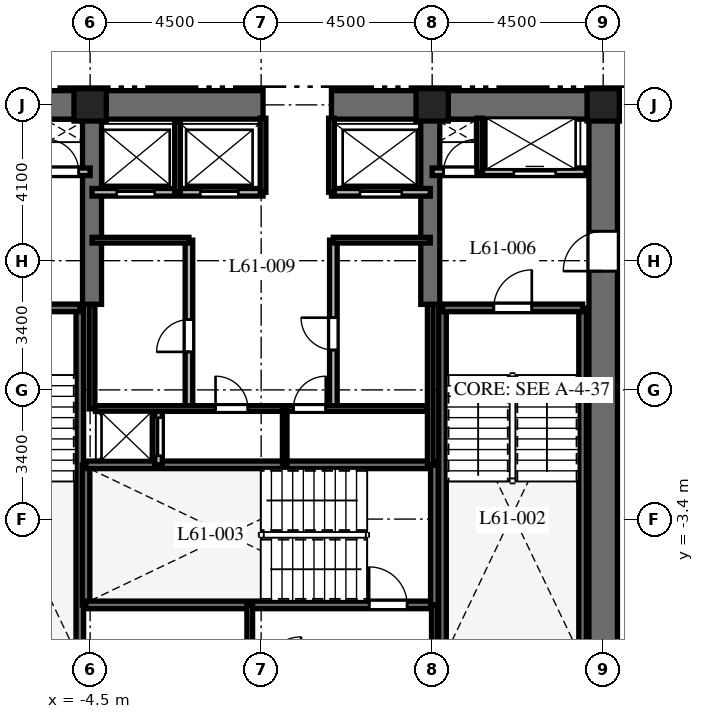
"""IFC4 building model, lengths in metres.
Left out: names, types, materials, properties, quantities, classifications, styles, units other than length and angle.
Written with IfcOpenShell. Run it as: python <this file> out.ifc"""

import sys

from ifc_helpers import new_model, si_unit, direction, frame, frame_2d, origin, origin_2d, place, context, subcontext, project, spatial, rectangle, extrude, element, fill, save


model = new_model("IFC4")
c1 = context("Model", 3, precision=1e-05, world=origin(), true_north=direction((0.0, 1.0)))
c2 = subcontext(c1, "Body", "Model", "MODEL_VIEW")
j1 = project(units=[si_unit("LENGTHUNIT", "METRE"), si_unit("PLANEANGLEUNIT", "RADIAN")], contexts=[c1])
p1 = place(None, origin())
s1 = spatial("IfcSite", under=j1, at=p1, CompositionType="ELEMENT")
p2 = place(p1, origin())
s2 = spatial("IfcBuilding", under=s1, at=p2, CompositionType="ELEMENT")
p3 = place(p2, frame((0.0, 0.0, 244.5)))
s3 = spatial("IfcBuildingStorey", under=s2, at=p3, CompositionType="ELEMENT", Elevation=244.5)
p4 = place(p3, frame((-9.375, 7.5, 0.0), z_axis=(0.0, 0.0, 1.0), x_axis=(1.0, 0.0, 0.0)))
e1 = element("IfcWall", 1, at=p4, inside=s3, PredefinedType="SHEAR", context=c2, shape_type="SweptSolid", body=[
    extrude(rectangle(XDim=9.425, YDim=0.75, at=frame_2d((4.712, 0.0))), origin(), (0.0, 0.0, 1.0), 3.8),
])
p5 = place(p3, frame((1.85, 7.5, 0.0), z_axis=(0.0, 0.0, 1.0), x_axis=(1.0, 0.0, 0.0)))
e2 = element("IfcWall", 2, at=p5, inside=s3, PredefinedType="SHEAR", context=c2, shape_type="SweptSolid", body=[
    extrude(rectangle(XDim=7.525, YDim=0.75, at=frame_2d((3.762, 0.0))), origin(), (0.0, 0.0, 1.0), 3.8),
])
p6 = place(p3, frame((9.0, -7.125, 0.0), z_axis=(0.0, 0.0, 1.0), x_axis=(0.0, 1.0, 0.0)))
e3 = element("IfcWall", 3, at=p6, inside=s3, PredefinedType="SHEAR", context=c2, shape_type="SweptSolid", body=[
    extrude(rectangle(XDim=14.25, YDim=0.75, at=frame_2d((7.125, 0.0))), origin(), (0.0, 0.0, 1.0), 3.8),
])
p7 = place(p6, frame((10.25, 0.0, 0.0)))
e4 = element("IfcOpeningElement", 4, at=p7, cuts=e3, PredefinedType="OPENING", context=c2, shape_type="SweptSolid", body=[
    extrude(rectangle(XDim=1.05, YDim=2.15, at=frame_2d((0.525, 1.075))), frame((0.0, 0.385, 0.0), z_axis=(0.0, -1.0, 0.0), x_axis=(1.0, 0.0, 0.0)), (0.0, 0.0, 1.0), 0.77),
])
for number, where, z_axis, x_axis in (
    (5, (-4.45, 2.25, 0.0), (0.0, 0.0, 1.0), (0.0, 1.0, 0.0)),
    (6, (4.45, 2.25, 0.0), (0.0, 0.0, 1.0), (0.0, 1.0, 0.0)),
):
    element("IfcWall", number, at=place(p3, frame(where, z_axis=z_axis, x_axis=x_axis)), inside=s3, PredefinedType="SHEAR", context=c2, shape_type="SweptSolid", body=[
        extrude(rectangle(XDim=4.875, YDim=0.5, at=frame_2d((2.438, 0.0))), origin(), (0.0, 0.0, 1.0), 3.8),
    ])
p8 = place(p3, frame((-4.772, -6.985, 0.0), z_axis=(0.0, 0.0, 1.0), x_axis=(0.0, 1.0, 0.0)))
e7 = element("IfcWall", 7, at=p8, inside=s3, PredefinedType="SHEAR", context=c2, shape_type="SweptSolid", body=[
    extrude(rectangle(XDim=9.143, YDim=0.2, at=frame_2d((4.572, 0.0))), origin(), (0.0, 0.0, 1.0), 3.8),
])
p9 = place(p3, frame((-8.458, 2.158, 0.0), z_axis=(0.0, 0.0, 1.0), x_axis=(1.0, 0.0, 0.0)))
e8 = element("IfcWall", 8, at=p9, inside=s3, PredefinedType="SHEAR", context=c2, shape_type="SweptSolid", body=[
    extrude(rectangle(XDim=3.686, YDim=0.2, at=frame_2d((1.843, 0.0))), origin(), (0.0, 0.0, 1.0), 3.8),
])
p10 = place(p9, frame((1.3, 0.0, 0.0)))
e9 = element("IfcOpeningElement", 9, at=p10, cuts=e8, PredefinedType="OPENING", context=c2, shape_type="SweptSolid", body=[
    extrude(rectangle(XDim=1.0, YDim=2.15, at=frame_2d((0.5, 1.075))), frame((0.0, 0.11, 0.0), z_axis=(0.0, -1.0, 0.0), x_axis=(1.0, 0.0, 0.0)), (0.0, 0.0, 1.0), 0.22),
])
for number, where, z_axis, x_axis in (
    (10, (4.772, -6.985, 0.0), (0.0, 0.0, 1.0), (0.0, 1.0, 0.0)),
    (11, (8.458, -6.985, 0.0), (0.0, 0.0, 1.0), (0.0, 1.0, 0.0)),
):
    element("IfcWall", number, at=place(p3, frame(where, z_axis=z_axis, x_axis=x_axis)), inside=s3, PredefinedType="SHEAR", context=c2, shape_type="SweptSolid", body=[
        extrude(rectangle(XDim=9.143, YDim=0.2, at=frame_2d((4.572, 0.0))), origin(), (0.0, 0.0, 1.0), 3.8),
    ])
p11 = place(p3, frame((4.772, 2.158, 0.0), z_axis=(0.0, 0.0, 1.0), x_axis=(1.0, 0.0, 0.0)))
e12 = element("IfcWall", 12, at=p11, inside=s3, PredefinedType="SHEAR", context=c2, shape_type="SweptSolid", body=[
    extrude(rectangle(XDim=3.686, YDim=0.2, at=frame_2d((1.843, 0.0))), origin(), (0.0, 0.0, 1.0), 3.8),
])
p12 = place(p11, frame((1.35, 0.0, 0.0)))
e13 = element("IfcOpeningElement", 13, at=p12, cuts=e12, PredefinedType="OPENING", context=c2, shape_type="SweptSolid", body=[
    extrude(rectangle(XDim=1.0, YDim=2.15, at=frame_2d((0.5, 1.075))), frame((0.0, 0.11, 0.0), z_axis=(0.0, -1.0, 0.0), x_axis=(1.0, 0.0, 0.0)), (0.0, 0.0, 1.0), 0.22),
])
p13 = place(p3, frame((-4.608, -5.658, 0.0), z_axis=(0.0, 0.0, 1.0), x_axis=(0.0, 1.0, 0.0)))
e14 = element("IfcWall", 14, at=p13, inside=s3, PredefinedType="SHEAR", context=c2, shape_type="SweptSolid", body=[
    extrude(rectangle(XDim=3.686, YDim=0.2, at=frame_2d((1.843, 0.0))), origin(), (0.0, 0.0, 1.0), 3.8),
])
p14 = place(p3, frame((-4.608, -5.658, 0.0), z_axis=(0.0, 0.0, 1.0), x_axis=(1.0, 0.0, 0.0)))
e15 = element("IfcWall", 15, at=p14, inside=s3, PredefinedType="SHEAR", context=c2, shape_type="SweptSolid", body=[
    extrude(rectangle(XDim=9.166, YDim=0.2, at=frame_2d((4.583, 0.0))), origin(), (0.0, 0.0, 1.0), 3.8),
])
p15 = place(p14, frame((7.45, 0.0, 0.0)))
e16 = element("IfcOpeningElement", 16, at=p15, cuts=e15, PredefinedType="OPENING", context=c2, shape_type="SweptSolid", body=[
    extrude(rectangle(XDim=1.0, YDim=2.15, at=frame_2d((0.5, 1.075))), frame((0.0, 0.11, 0.0), z_axis=(0.0, -1.0, 0.0), x_axis=(1.0, 0.0, 0.0)), (0.0, 0.0, 1.0), 0.22),
])
p16 = place(p3, frame((-4.608, -1.972, 0.0), z_axis=(0.0, 0.0, 1.0), x_axis=(1.0, 0.0, 0.0)))
e17 = element("IfcWall", 17, at=p16, inside=s3, PredefinedType="SHEAR", context=c2, shape_type="SweptSolid", body=[
    extrude(rectangle(XDim=9.166, YDim=0.2, at=frame_2d((4.583, 0.0))), origin(), (0.0, 0.0, 1.0), 3.8),
])
p17 = place(p3, frame((4.558, -5.658, 0.0), z_axis=(0.0, 0.0, 1.0), x_axis=(0.0, 1.0, 0.0)))
e18 = element("IfcWall", 18, at=p17, inside=s3, PredefinedType="SHEAR", context=c2, shape_type="SweptSolid", body=[
    extrude(rectangle(XDim=3.686, YDim=0.2, at=frame_2d((1.843, 0.0))), origin(), (0.0, 0.0, 1.0), 3.8),
])
for number, where, z_axis, x_axis in (
    (19, (9.0, 7.5, 0.0), (0.0, 0.0, 1.0), (1.0, 0.0, 0.0)),
    (20, (4.5, 7.5, 0.0), (0.0, 0.0, 1.0), (1.0, 0.0, 0.0)),
    (21, (-4.5, 7.5, 0.0), (0.0, 0.0, 1.0), (1.0, 0.0, 0.0)),
):
    element("IfcColumn", number, at=place(p3, frame(where, z_axis=z_axis, x_axis=x_axis)), inside=s3, PredefinedType="COLUMN", context=c2, shape_type="SweptSolid", body=[
        extrude(rectangle(XDim=0.85, YDim=0.85, at=origin_2d()), origin(), (0.0, 0.0, 1.0), 3.8),
    ])
for number, where, z_axis, x_axis in (
    (22, (-0.3, -7.02, 0.0), (0.0, 0.0, 1.0), (0.0, 1.0, 0.0)),
    (23, (4.558, -7.02, 0.0), (0.0, 0.0, 1.0), (0.0, 1.0, 0.0)),
):
    element("IfcWall", number, at=place(p3, frame(where, z_axis=z_axis, x_axis=x_axis)), inside=s3, PredefinedType="PARTITIONING", context=c2, shape_type="SweptSolid", body=[
        extrude(rectangle(XDim=1.362, YDim=0.15, at=frame_2d((0.681, 0.0))), origin(), (0.0, 0.0, 1.0), 3.5),
    ])
p18 = place(p3, frame((-8.55, 5.74, 0.0), z_axis=(0.0, 0.0, 1.0), x_axis=(1.0, 0.0, 0.0)))
e24 = element("IfcWall", 24, at=p18, inside=s3, PredefinedType="PARTITIONING", context=c2, shape_type="SweptSolid", body=[
    extrude(rectangle(XDim=4.05, YDim=0.2, at=frame_2d((2.025, 0.0))), origin(), (0.0, 0.0, 1.0), 3.5),
])
p19 = place(p18, frame((0.75, 0.0, 0.0)))
e25 = element("IfcOpeningElement", 25, at=p19, cuts=e24, PredefinedType="OPENING", context=c2, shape_type="SweptSolid", body=[
    extrude(rectangle(XDim=1.1, YDim=2.2, at=frame_2d((0.55, 1.1))), frame((0.0, 0.11, 0.0), z_axis=(0.0, -1.0, 0.0), x_axis=(1.0, 0.0, 0.0)), (0.0, 0.0, 1.0), 0.22),
])
p20 = place(p18, frame((2.9, 0.0, 0.0)))
e26 = element("IfcOpeningElement", 26, at=p20, cuts=e24, PredefinedType="OPENING", context=c2, shape_type="SweptSolid", body=[
    extrude(rectangle(XDim=0.85, YDim=2.03, at=frame_2d((0.425, 1.015))), frame((0.0, 0.11, 0.0), z_axis=(0.0, -1.0, 0.0), x_axis=(1.0, 0.0, 0.0)), (0.0, 0.0, 1.0), 0.22),
])
p21 = place(p3, frame((4.5, 5.74, 0.0), z_axis=(0.0, 0.0, 1.0), x_axis=(1.0, 0.0, 0.0)))
e27 = element("IfcWall", 27, at=p21, inside=s3, PredefinedType="PARTITIONING", context=c2, shape_type="SweptSolid", body=[
    extrude(rectangle(XDim=4.05, YDim=0.2, at=frame_2d((2.025, 0.0))), origin(), (0.0, 0.0, 1.0), 3.5),
])
p22 = place(p21, frame((0.3, 0.0, 0.0)))
e28 = element("IfcOpeningElement", 28, at=p22, cuts=e27, PredefinedType="OPENING", context=c2, shape_type="SweptSolid", body=[
    extrude(rectangle(XDim=0.85, YDim=2.03, at=frame_2d((0.425, 1.015))), frame((0.0, 0.11, 0.0), z_axis=(0.0, -1.0, 0.0), x_axis=(1.0, 0.0, 0.0)), (0.0, 0.0, 1.0), 0.22),
])
p23 = place(p21, frame((2.15, 0.0, 0.0)))
e29 = element("IfcOpeningElement", 29, at=p23, cuts=e27, PredefinedType="OPENING", context=c2, shape_type="SweptSolid", body=[
    extrude(rectangle(XDim=1.1, YDim=2.2, at=frame_2d((0.55, 1.1))), frame((0.0, 0.11, 0.0), z_axis=(0.0, -1.0, 0.0), x_axis=(1.0, 0.0, 0.0)), (0.0, 0.0, 1.0), 0.22),
])
p24 = place(p3, frame((5.75, 5.74, 0.0), z_axis=(0.0, 0.0, 1.0), x_axis=(0.0, 1.0, 0.0)))
e30 = element("IfcWall", 30, at=p24, inside=s3, PredefinedType="PARTITIONING", context=c2, shape_type="SweptSolid", body=[
    extrude(rectangle(XDim=1.41, YDim=0.15, at=frame_2d((0.705, 0.0))), origin(), (0.0, 0.0, 1.0), 3.5),
])
p25 = place(p3, frame((-2.7, -1.972, 0.0), z_axis=(0.0, 0.0, 1.0), x_axis=(0.0, 1.0, 0.0)))
e31 = element("IfcWall", 31, at=p25, inside=s3, PredefinedType="PARTITIONING", context=c2, shape_type="SweptSolid", body=[
    extrude(rectangle(XDim=1.472, YDim=0.2, at=frame_2d((0.736, 0.0))), origin(), (0.0, 0.0, 1.0), 3.5),
])
p26 = place(p25, frame((0.24, 0.0, 0.0)))
e32 = element("IfcOpeningElement", 32, at=p26, cuts=e31, PredefinedType="OPENING", context=c2, shape_type="SweptSolid", body=[
    extrude(rectangle(XDim=1.0, YDim=2.2, at=frame_2d((0.5, 1.1))), frame((0.0, 0.11, 0.0), z_axis=(0.0, -1.0, 0.0), x_axis=(1.0, 0.0, 0.0)), (0.0, 0.0, 1.0), 0.22),
])
p27 = place(p3, frame((-4.45, 5.2, 0.0), z_axis=(0.0, 0.0, 1.0), x_axis=(1.0, 0.0, 0.0)))
e33 = element("IfcWall", 33, at=p27, inside=s3, PredefinedType="PARTITIONING", context=c2, shape_type="SweptSolid", body=[
    extrude(rectangle(XDim=4.5, YDim=0.2, at=frame_2d((2.25, 0.0))), origin(), (0.0, 0.0, 1.0), 3.5),
])
p28 = place(p27, frame((0.65, 0.0, 0.0)))
e34 = element("IfcOpeningElement", 34, at=p28, cuts=e33, PredefinedType="OPENING", context=c2, shape_type="SweptSolid", body=[
    extrude(rectangle(XDim=1.0, YDim=2.2, at=frame_2d((0.5, 1.1))), frame((0.0, 0.11, 0.0), z_axis=(0.0, -1.0, 0.0), x_axis=(1.0, 0.0, 0.0)), (0.0, 0.0, 1.0), 0.22),
])
p29 = place(p27, frame((2.85, 0.0, 0.0)))
e35 = element("IfcOpeningElement", 35, at=p29, cuts=e33, PredefinedType="OPENING", context=c2, shape_type="SweptSolid", body=[
    extrude(rectangle(XDim=1.0, YDim=2.2, at=frame_2d((0.5, 1.1))), frame((0.0, 0.11, 0.0), z_axis=(0.0, -1.0, 0.0), x_axis=(1.0, 0.0, 0.0)), (0.0, 0.0, 1.0), 0.22),
])
p30 = place(p3, frame((1.85, 5.2, 0.0), z_axis=(0.0, 0.0, 1.0), x_axis=(1.0, 0.0, 0.0)))
e36 = element("IfcWall", 36, at=p30, inside=s3, PredefinedType="PARTITIONING", context=c2, shape_type="SweptSolid", body=[
    extrude(rectangle(XDim=2.6, YDim=0.2, at=frame_2d((1.3, 0.0))), origin(), (0.0, 0.0, 1.0), 3.5),
])
p31 = place(p30, frame((0.75, 0.0, 0.0)))
e37 = element("IfcOpeningElement", 37, at=p31, cuts=e36, PredefinedType="OPENING", context=c2, shape_type="SweptSolid", body=[
    extrude(rectangle(XDim=1.1, YDim=2.2, at=frame_2d((0.55, 1.1))), frame((0.0, 0.11, 0.0), z_axis=(0.0, -1.0, 0.0), x_axis=(1.0, 0.0, 0.0)), (0.0, 0.0, 1.0), 0.22),
])
p32 = place(p3, frame((-2.2, 5.2, 0.0), z_axis=(0.0, 0.0, 1.0), x_axis=(0.0, 1.0, 0.0)))
e38 = element("IfcWall", 38, at=p32, inside=s3, PredefinedType="PARTITIONING", context=c2, shape_type="SweptSolid", body=[
    extrude(rectangle(XDim=1.85, YDim=0.15, at=frame_2d((0.925, 0.0))), origin(), (0.0, 0.0, 1.0), 3.5),
])
for number, where, z_axis, x_axis in (
    (39, (0.05, 5.2, 0.0), (0.0, 0.0, 1.0), (0.0, 1.0, 0.0)),
    (40, (1.85, 5.2, 0.0), (0.0, 0.0, 1.0), (0.0, 1.0, 0.0)),
):
    element("IfcWall", number, at=place(p3, frame(where, z_axis=z_axis, x_axis=x_axis)), inside=s3, PredefinedType="PARTITIONING", context=c2, shape_type="SweptSolid", body=[
        extrude(rectangle(XDim=1.95, YDim=0.15, at=frame_2d((0.975, 0.0))), origin(), (0.0, 0.0, 1.0), 3.5),
    ])
p33 = place(p3, frame((-4.45, -0.5, 0.0), z_axis=(0.0, 0.0, 1.0), x_axis=(0.0, 1.0, 0.0)))
e41 = element("IfcWall", 41, at=p33, inside=s3, PredefinedType="PARTITIONING", context=c2, shape_type="SweptSolid", body=[
    extrude(rectangle(XDim=2.75, YDim=0.15, at=frame_2d((1.375, 0.0))), origin(), (0.0, 0.0, 1.0), 3.5),
])
p34 = place(p3, frame((4.45, -1.972, 0.0), z_axis=(0.0, 0.0, 1.0), x_axis=(0.0, 1.0, 0.0)))
e42 = element("IfcWall", 42, at=p34, inside=s3, PredefinedType="PARTITIONING", context=c2, shape_type="SweptSolid", body=[
    extrude(rectangle(XDim=4.222, YDim=0.15, at=frame_2d((2.111, 0.0))), origin(), (0.0, 0.0, 1.0), 3.5),
])
p35 = place(p3, frame((-1.9, -0.5, 0.0), z_axis=(0.0, 0.0, 1.0), x_axis=(0.0, 1.0, 0.0)))
e43 = element("IfcWall", 43, at=p35, inside=s3, PredefinedType="PARTITIONING", context=c2, shape_type="SweptSolid", body=[
    extrude(rectangle(XDim=4.44, YDim=0.2, at=frame_2d((2.22, 0.0))), origin(), (0.0, 0.0, 1.0), 3.5),
])
p36 = place(p35, frame((1.5, 0.0, 0.0)))
e44 = element("IfcOpeningElement", 44, at=p36, cuts=e43, PredefinedType="OPENING", context=c2, shape_type="SweptSolid", body=[
    extrude(rectangle(XDim=0.85, YDim=2.03, at=frame_2d((0.425, 1.015))), frame((0.0, 0.11, 0.0), z_axis=(0.0, -1.0, 0.0), x_axis=(1.0, 0.0, 0.0)), (0.0, 0.0, 1.0), 0.22),
])
p37 = place(p3, frame((-4.45, 3.94, 0.0), z_axis=(0.0, 0.0, 1.0), x_axis=(1.0, 0.0, 0.0)))
e45 = element("IfcWall", 45, at=p37, inside=s3, PredefinedType="PARTITIONING", context=c2, shape_type="SweptSolid", body=[
    extrude(rectangle(XDim=2.55, YDim=0.15, at=frame_2d((1.275, 0.0))), origin(), (0.0, 0.0, 1.0), 3.5),
])
p38 = place(p3, frame((1.9, -0.5, 0.0), z_axis=(0.0, 0.0, 1.0), x_axis=(0.0, 1.0, 0.0)))
e46 = element("IfcWall", 46, at=p38, inside=s3, PredefinedType="PARTITIONING", context=c2, shape_type="SweptSolid", body=[
    extrude(rectangle(XDim=4.44, YDim=0.2, at=frame_2d((2.22, 0.0))), origin(), (0.0, 0.0, 1.0), 3.5),
])
p39 = place(p38, frame((1.55, 0.0, 0.0)))
e47 = element("IfcOpeningElement", 47, at=p39, cuts=e46, PredefinedType="OPENING", context=c2, shape_type="SweptSolid", body=[
    extrude(rectangle(XDim=0.85, YDim=2.03, at=frame_2d((0.425, 1.015))), frame((0.0, 0.11, 0.0), z_axis=(0.0, -1.0, 0.0), x_axis=(1.0, 0.0, 0.0)), (0.0, 0.0, 1.0), 0.22),
])
p40 = place(p3, frame((1.9, 3.94, 0.0), z_axis=(0.0, 0.0, 1.0), x_axis=(1.0, 0.0, 0.0)))
e48 = element("IfcWall", 48, at=p40, inside=s3, PredefinedType="PARTITIONING", context=c2, shape_type="SweptSolid", body=[
    extrude(rectangle(XDim=2.55, YDim=0.15, at=frame_2d((1.275, 0.0))), origin(), (0.0, 0.0, 1.0), 3.5),
])
p41 = place(p3, frame((-4.36, -0.49, 0.0), z_axis=(0.0, 0.0, 1.0), x_axis=(1.0, 0.0, 0.0)))
e49 = element("IfcWall", 49, at=p41, inside=s3, PredefinedType="PARTITIONING", context=c2, shape_type="SweptSolid", body=[
    extrude(rectangle(XDim=8.72, YDim=0.15, at=frame_2d((4.36, 0.0))), origin(), (0.0, 0.0, 1.0), 3.5),
])
p42 = place(p41, frame((3.16, 0.0, 0.0)))
e50 = element("IfcOpeningElement", 50, at=p42, cuts=e49, PredefinedType="OPENING", context=c2, shape_type="SweptSolid", body=[
    extrude(rectangle(XDim=0.85, YDim=2.03, at=frame_2d((0.425, 1.015))), frame((0.0, 0.085, 0.0), z_axis=(0.0, -1.0, 0.0), x_axis=(1.0, 0.0, 0.0)), (0.0, 0.0, 1.0), 0.17),
])
p43 = place(p41, frame((5.21, 0.0, 0.0)))
e51 = element("IfcOpeningElement", 51, at=p43, cuts=e49, PredefinedType="OPENING", context=c2, shape_type="SweptSolid", body=[
    extrude(rectangle(XDim=0.85, YDim=2.03, at=frame_2d((0.425, 1.015))), frame((0.0, 0.085, 0.0), z_axis=(0.0, -1.0, 0.0), x_axis=(1.0, 0.0, 0.0)), (0.0, 0.0, 1.0), 0.17),
])
p44 = place(p3, frame((0.62, -1.972, 0.0), z_axis=(0.0, 0.0, 1.0), x_axis=(0.0, 1.0, 0.0)))
e52 = element("IfcWall", 52, at=p44, inside=s3, PredefinedType="PARTITIONING", context=c2, shape_type="SweptSolid", body=[
    extrude(rectangle(XDim=1.472, YDim=0.12, at=frame_2d((0.736, 0.0))), origin(), (0.0, 0.0, 1.0), 3.5),
])
p45 = place(p12, origin())
e53 = element("IfcDoor", 53, at=p45, inside=s3, OperationType="SINGLE_SWING_RIGHT", PredefinedType="DOOR", context=c2, shape_type="SweptSolid", body=[
    extrude(rectangle(XDim=1.0, YDim=2.15, at=frame_2d((0.5, 1.075))), frame((0.0, 0.025, 0.0), z_axis=(0.0, -1.0, 0.0), x_axis=(1.0, 0.0, 0.0)), (0.0, 0.0, 1.0), 0.05),
])
fill(e13, e53)
p46 = place(p15, origin())
e54 = element("IfcDoor", 54, at=p46, inside=s3, OperationType="SINGLE_SWING_LEFT", PredefinedType="DOOR", context=c2, shape_type="SweptSolid", body=[
    extrude(rectangle(XDim=1.0, YDim=2.15, at=frame_2d((0.5, 1.075))), frame((0.0, 0.025, 0.0), z_axis=(0.0, -1.0, 0.0), x_axis=(1.0, 0.0, 0.0)), (0.0, 0.0, 1.0), 0.05),
])
fill(e16, e54)
p47 = place(p7, origin())
e55 = element("IfcDoor", 55, at=p47, inside=s3, OperationType="SINGLE_SWING_LEFT", PredefinedType="DOOR", context=c2, shape_type="SweptSolid", body=[
    extrude(rectangle(XDim=1.05, YDim=2.15, at=frame_2d((0.525, 1.075))), frame((0.0, 0.025, 0.0), z_axis=(0.0, -1.0, 0.0), x_axis=(1.0, 0.0, 0.0)), (0.0, 0.0, 1.0), 0.05),
])
fill(e4, e55)
p48 = place(p20, origin())
e56 = element("IfcDoor", 56, at=p48, inside=s3, OperationType="SINGLE_SWING_LEFT", PredefinedType="DOOR", context=c2, shape_type="SweptSolid", body=[
    extrude(rectangle(XDim=0.85, YDim=2.03, at=frame_2d((0.425, 1.015))), frame((0.0, 0.025, 0.0), z_axis=(0.0, -1.0, 0.0), x_axis=(1.0, 0.0, 0.0)), (0.0, 0.0, 1.0), 0.05),
])
fill(e26, e56)
p49 = place(p22, origin())
e57 = element("IfcDoor", 57, at=p49, inside=s3, OperationType="SINGLE_SWING_RIGHT", PredefinedType="DOOR", context=c2, shape_type="SweptSolid", body=[
    extrude(rectangle(XDim=0.85, YDim=2.03, at=frame_2d((0.425, 1.015))), frame((0.0, 0.025, 0.0), z_axis=(0.0, -1.0, 0.0), x_axis=(1.0, 0.0, 0.0)), (0.0, 0.0, 1.0), 0.05),
])
fill(e28, e57)
p50 = place(p23, origin())
e58 = element("IfcDoor", 58, at=p50, inside=s3, OperationType="SLIDING_TO_RIGHT", PredefinedType="DOOR", context=c2, shape_type="SweptSolid", body=[
    extrude(rectangle(XDim=1.1, YDim=2.2, at=frame_2d((0.55, 1.1))), frame((0.0, 0.025, 0.0), z_axis=(0.0, -1.0, 0.0), x_axis=(1.0, 0.0, 0.0)), (0.0, 0.0, 1.0), 0.05),
])
fill(e29, e58)
p51 = place(p26, origin())
e59 = element("IfcDoor", 59, at=p51, inside=s3, OperationType="SLIDING_TO_LEFT", PredefinedType="DOOR", context=c2, shape_type="SweptSolid", body=[
    extrude(rectangle(XDim=1.0, YDim=2.2, at=frame_2d((0.5, 1.1))), frame((0.0, 0.025, 0.0), z_axis=(0.0, -1.0, 0.0), x_axis=(1.0, 0.0, 0.0)), (0.0, 0.0, 1.0), 0.05),
])
fill(e32, e59)
p52 = place(p28, origin())
e60 = element("IfcDoor", 60, at=p52, inside=s3, OperationType="SLIDING_TO_LEFT", PredefinedType="DOOR", context=c2, shape_type="SweptSolid", body=[
    extrude(rectangle(XDim=1.0, YDim=2.2, at=frame_2d((0.5, 1.1))), frame((0.0, 0.025, 0.0), z_axis=(0.0, -1.0, 0.0), x_axis=(1.0, 0.0, 0.0)), (0.0, 0.0, 1.0), 0.05),
])
fill(e34, e60)
p53 = place(p29, origin())
e61 = element("IfcDoor", 61, at=p53, inside=s3, OperationType="SLIDING_TO_RIGHT", PredefinedType="DOOR", context=c2, shape_type="SweptSolid", body=[
    extrude(rectangle(XDim=1.0, YDim=2.2, at=frame_2d((0.5, 1.1))), frame((0.0, 0.025, 0.0), z_axis=(0.0, -1.0, 0.0), x_axis=(1.0, 0.0, 0.0)), (0.0, 0.0, 1.0), 0.05),
])
fill(e35, e61)
p54 = place(p31, origin())
e62 = element("IfcDoor", 62, at=p54, inside=s3, OperationType="SLIDING_TO_RIGHT", PredefinedType="DOOR", context=c2, shape_type="SweptSolid", body=[
    extrude(rectangle(XDim=1.1, YDim=2.2, at=frame_2d((0.55, 1.1))), frame((0.0, 0.025, 0.0), z_axis=(0.0, -1.0, 0.0), x_axis=(1.0, 0.0, 0.0)), (0.0, 0.0, 1.0), 0.05),
])
fill(e37, e62)
p55 = place(p36, origin())
e63 = element("IfcDoor", 63, at=p55, inside=s3, OperationType="SINGLE_SWING_LEFT", PredefinedType="DOOR", context=c2, shape_type="SweptSolid", body=[
    extrude(rectangle(XDim=0.85, YDim=2.03, at=frame_2d((0.425, 1.015))), frame((0.0, 0.025, 0.0), z_axis=(0.0, -1.0, 0.0), x_axis=(1.0, 0.0, 0.0)), (0.0, 0.0, 1.0), 0.05),
])
fill(e44, e63)
p56 = place(p39, origin())
e64 = element("IfcDoor", 64, at=p56, inside=s3, OperationType="SINGLE_SWING_RIGHT", PredefinedType="DOOR", context=c2, shape_type="SweptSolid", body=[
    extrude(rectangle(XDim=0.85, YDim=2.03, at=frame_2d((0.425, 1.015))), frame((0.0, 0.025, 0.0), z_axis=(0.0, -1.0, 0.0), x_axis=(1.0, 0.0, 0.0)), (0.0, 0.0, 1.0), 0.05),
])
fill(e47, e64)
p57 = place(p42, origin())
e65 = element("IfcDoor", 65, at=p57, inside=s3, OperationType="SINGLE_SWING_LEFT", PredefinedType="DOOR", context=c2, shape_type="SweptSolid", body=[
    extrude(rectangle(XDim=0.85, YDim=2.03, at=frame_2d((0.425, 1.015))), frame((0.0, 0.025, 0.0), z_axis=(0.0, -1.0, 0.0), x_axis=(1.0, 0.0, 0.0)), (0.0, 0.0, 1.0), 0.05),
])
fill(e50, e65)
p58 = place(p43, origin())
e66 = element("IfcDoor", 66, at=p58, inside=s3, OperationType="SINGLE_SWING_RIGHT", PredefinedType="DOOR", context=c2, shape_type="SweptSolid", body=[
    extrude(rectangle(XDim=0.85, YDim=2.03, at=frame_2d((0.425, 1.015))), frame((0.0, 0.025, 0.0), z_axis=(0.0, -1.0, 0.0), x_axis=(1.0, 0.0, 0.0)), (0.0, 0.0, 1.0), 0.05),
])
fill(e51, e66)
save(model, sys.argv[1])
